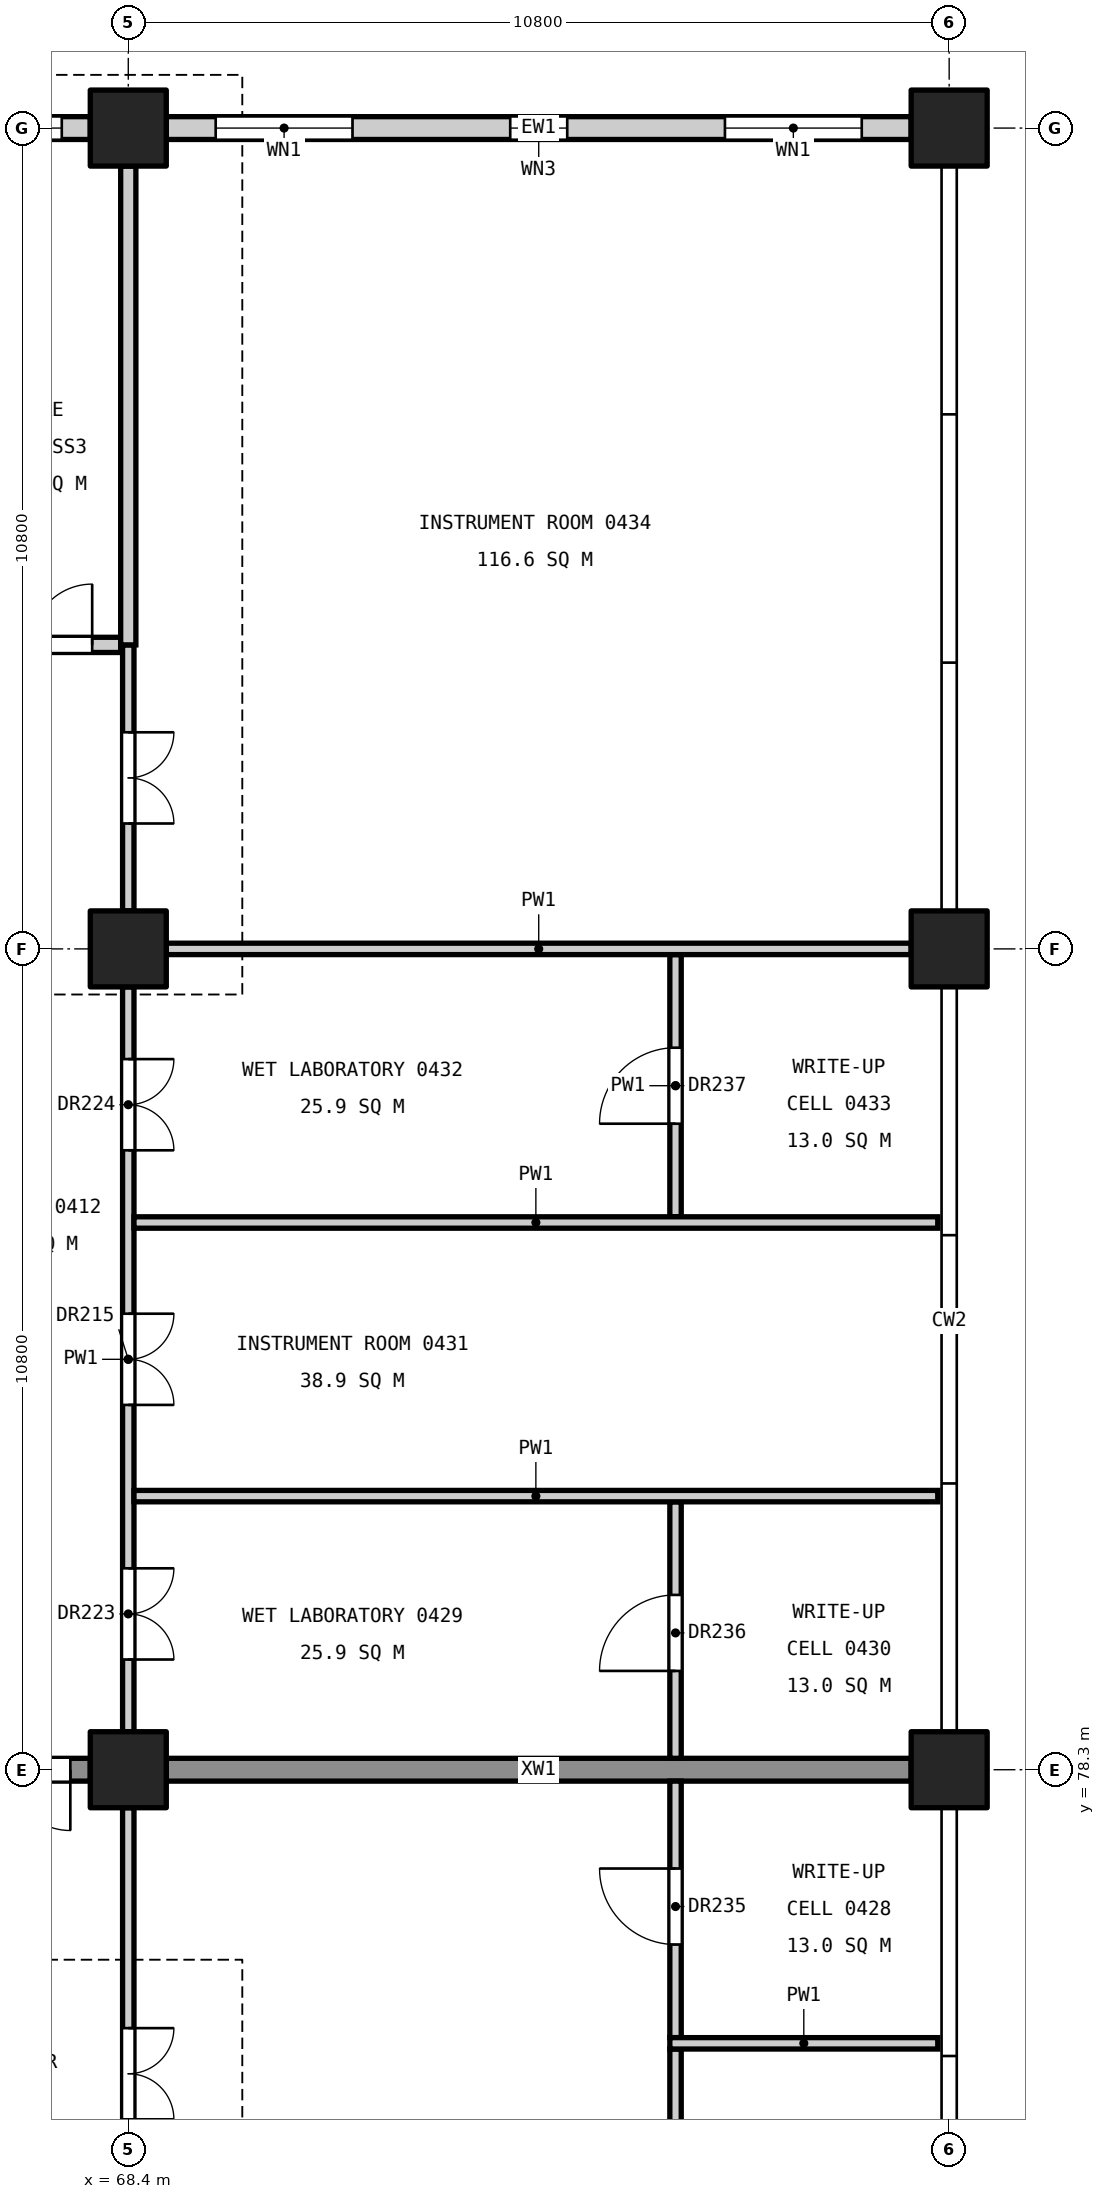
"""IFC4 building model, lengths in metres.
Left out: names, types, materials, properties, quantities, classifications, styles, units other than length and angle.
Written with IfcOpenShell. Run it as: python <this file> out.ifc"""

import sys

from ifc_helpers import new_model, si_unit, direction, frame, frame_2d, origin, origin_2d, place, context, subcontext, project, spatial, rectangle, extrude, element, fill, save


model = new_model("IFC4")
c1 = context("Model", 3, precision=1e-05, world=origin(), true_north=direction((0.0, 1.0)))
c2 = subcontext(c1, "Body", "Model", "MODEL_VIEW")
j1 = project(units=[si_unit("LENGTHUNIT", "METRE"), si_unit("PLANEANGLEUNIT", "RADIAN")], contexts=[c1])
p1 = place(None, origin())
s1 = spatial("IfcSite", under=j1, at=p1, CompositionType="ELEMENT")
p2 = place(p1, origin())
s2 = spatial("IfcBuilding", under=s1, at=p2, CompositionType="ELEMENT")
p3 = place(p2, frame((0.0, 0.0, 22.2)))
s3 = spatial("IfcBuildingStorey", under=s2, at=p3, CompositionType="ELEMENT", Elevation=22.2)
for number, where, z_axis, x_axis in (
    (1, (68.4, 78.3, 0.0), (0.0, 0.0, 1.0), (1.0, 0.0, 0.0)),
    (2, (68.4, 89.1, 0.0), (0.0, 0.0, 1.0), (1.0, 0.0, 0.0)),
    (3, (68.4, 99.9, 0.0), (0.0, 0.0, 1.0), (1.0, 0.0, 0.0)),
    (4, (79.2, 78.3, 0.0), (0.0, 0.0, 1.0), (1.0, 0.0, 0.0)),
    (5, (79.2, 89.1, 0.0), (0.0, 0.0, 1.0), (1.0, 0.0, 0.0)),
    (6, (79.2, 99.9, 0.0), (0.0, 0.0, 1.0), (1.0, 0.0, 0.0)),
):
    element("IfcColumn", number, at=place(p3, frame(where, z_axis=z_axis, x_axis=x_axis)), inside=s3, PredefinedType="COLUMN", context=c2, shape_type="SweptSolid", body=[
        extrude(rectangle(XDim=1.0, YDim=1.0, at=origin_2d()), origin(), (0.0, 0.0, 1.0), 4.8),
    ])
p4 = place(p3, frame((61.7, 78.3, 0.0), z_axis=(0.0, 0.0, 1.0), x_axis=(1.0, 0.0, 0.0)))
e7 = element("IfcWall", 7, at=p4, inside=s3, PredefinedType="SHEAR", context=c2, shape_type="SweptSolid", body=[
    extrude(rectangle(XDim=6.2, YDim=0.3, at=frame_2d((3.1, 0.0))), origin(), (0.0, 0.0, 1.0), 4.55),
])
p5 = place(p4, frame((4.337, 0.0, 0.0)))
e8 = element("IfcOpeningElement", 8, at=p5, cuts=e7, PredefinedType="OPENING", context=c2, shape_type="SweptSolid", body=[
    extrude(rectangle(XDim=1.6, YDim=2.1, at=frame_2d((0.8, 1.05))), frame((0.0, 0.16, 0.0), z_axis=(0.0, -1.0, 0.0), x_axis=(1.0, 0.0, 0.0)), (0.0, 0.0, 1.0), 0.32),
])
p6 = place(p3, frame((68.9, 78.3, 0.0), z_axis=(0.0, 0.0, 1.0), x_axis=(1.0, 0.0, 0.0)))
e9 = element("IfcWall", 9, at=p6, inside=s3, PredefinedType="SHEAR", context=c2, shape_type="SweptSolid", body=[
    extrude(rectangle(XDim=9.8, YDim=0.3, at=frame_2d((4.9, 0.0))), origin(), (0.0, 0.0, 1.0), 4.55),
])
p7 = place(p3, frame((65.95, 99.9, 0.0), z_axis=(0.0, 0.0, 1.0), x_axis=(1.0, 0.0, 0.0)))
e10 = element("IfcWall", 10, at=p7, inside=s3, PredefinedType="STANDARD", context=c2, shape_type="SweptSolid", body=[
    extrude(rectangle(XDim=1.95, YDim=0.3, at=frame_2d((0.975, 0.0))), origin(), (0.0, 0.0, 1.0), 3.85),
])
p8 = place(p7, frame((0.375, 0.0, 0.9)))
e11 = element("IfcOpeningElement", 11, at=p8, cuts=e10, PredefinedType="OPENING", context=c2, shape_type="SweptSolid", body=[
    extrude(rectangle(XDim=1.2, YDim=2.4, at=frame_2d((0.6, 1.2))), frame((0.0, 0.16, 0.0), z_axis=(0.0, -1.0, 0.0), x_axis=(1.0, 0.0, 0.0)), (0.0, 0.0, 1.0), 0.32),
])
p9 = place(p3, frame((68.9, 99.9, 0.0), z_axis=(0.0, 0.0, 1.0), x_axis=(1.0, 0.0, 0.0)))
e12 = element("IfcWall", 12, at=p9, inside=s3, PredefinedType="STANDARD", context=c2, shape_type="SweptSolid", body=[
    extrude(rectangle(XDim=9.8, YDim=0.3, at=frame_2d((4.9, 0.0))), origin(), (0.0, 0.0, 1.0), 3.85),
])
p10 = place(p9, frame((0.65, 0.0, 0.9)))
e13 = element("IfcOpeningElement", 13, at=p10, cuts=e12, PredefinedType="OPENING", context=c2, shape_type="SweptSolid", body=[
    extrude(rectangle(XDim=1.8, YDim=2.4, at=frame_2d((0.9, 1.2))), frame((0.0, 0.16, 0.0), z_axis=(0.0, -1.0, 0.0), x_axis=(1.0, 0.0, 0.0)), (0.0, 0.0, 1.0), 0.32),
])
p11 = place(p9, frame((4.525, 0.0, 0.8)))
e14 = element("IfcOpeningElement", 14, at=p11, cuts=e12, PredefinedType="OPENING", context=c2, shape_type="SweptSolid", body=[
    extrude(rectangle(XDim=0.75, YDim=1.2, at=frame_2d((0.375, 0.6))), frame((0.0, 0.16, 0.0), z_axis=(0.0, -1.0, 0.0), x_axis=(1.0, 0.0, 0.0)), (0.0, 0.0, 1.0), 0.32),
])
p12 = place(p9, frame((7.35, 0.0, 0.9)))
e15 = element("IfcOpeningElement", 15, at=p12, cuts=e12, PredefinedType="OPENING", context=c2, shape_type="SweptSolid", body=[
    extrude(rectangle(XDim=1.8, YDim=2.4, at=frame_2d((0.9, 1.2))), frame((0.0, 0.16, 0.0), z_axis=(0.0, -1.0, 0.0), x_axis=(1.0, 0.0, 0.0)), (0.0, 0.0, 1.0), 0.32),
])
p13 = place(p3, frame((65.95, 93.1, 0.0), z_axis=(0.0, 0.0, 1.0), x_axis=(1.0, 0.0, 0.0)))
e16 = element("IfcWall", 16, at=p13, inside=s3, PredefinedType="PARTITIONING", context=c2, shape_type="SweptSolid", body=[
    extrude(rectangle(XDim=2.35, YDim=0.2, at=frame_2d((1.175, 0.0))), origin(), (0.0, 0.0, 1.0), 3.55),
])
p14 = place(p13, frame((0.375, 0.0, 0.0)))
e17 = element("IfcOpeningElement", 17, at=p14, cuts=e16, PredefinedType="OPENING", context=c2, shape_type="SweptSolid", body=[
    extrude(rectangle(XDim=1.6, YDim=2.1, at=frame_2d((0.8, 1.05))), frame((0.0, 0.11, 0.0), z_axis=(0.0, -1.0, 0.0), x_axis=(1.0, 0.0, 0.0)), (0.0, 0.0, 1.0), 0.22),
])
p15 = place(p3, frame((68.4, 70.8, 0.0), z_axis=(0.0, 0.0, 1.0), x_axis=(0.0, 1.0, 0.0)))
e18 = element("IfcWall", 18, at=p15, inside=s3, PredefinedType="PARTITIONING", context=c2, shape_type="SweptSolid", body=[
    extrude(rectangle(XDim=7.0, YDim=0.15, at=frame_2d((3.5, 0.0))), origin(), (0.0, 0.0, 1.0), 3.55),
])
p16 = place(p15, frame((2.9, 0.0, 0.0)))
e19 = element("IfcOpeningElement", 19, at=p16, cuts=e18, PredefinedType="OPENING", context=c2, shape_type="SweptSolid", body=[
    extrude(rectangle(XDim=1.2, YDim=2.1, at=frame_2d((0.6, 1.05))), frame((0.0, 0.085, 0.0), z_axis=(0.0, -1.0, 0.0), x_axis=(1.0, 0.0, 0.0)), (0.0, 0.0, 1.0), 0.17),
])
p17 = place(p3, frame((68.4, 78.8, 0.0), z_axis=(0.0, 0.0, 1.0), x_axis=(0.0, 1.0, 0.0)))
e20 = element("IfcWall", 20, at=p17, inside=s3, PredefinedType="PARTITIONING", context=c2, shape_type="SweptSolid", body=[
    extrude(rectangle(XDim=9.8, YDim=0.15, at=frame_2d((4.9, 0.0))), origin(), (0.0, 0.0, 1.0), 3.55),
])
p18 = place(p17, frame((4.3, 0.0, 0.0)))
e21 = element("IfcOpeningElement", 21, at=p18, cuts=e20, PredefinedType="OPENING", context=c2, shape_type="SweptSolid", body=[
    extrude(rectangle(XDim=1.2, YDim=2.1, at=frame_2d((0.6, 1.05))), frame((0.0, 0.085, 0.0), z_axis=(0.0, -1.0, 0.0), x_axis=(1.0, 0.0, 0.0)), (0.0, 0.0, 1.0), 0.17),
])
p19 = place(p17, frame((0.95, 0.0, 0.0)))
e22 = element("IfcOpeningElement", 22, at=p19, cuts=e20, PredefinedType="OPENING", context=c2, shape_type="SweptSolid", body=[
    extrude(rectangle(XDim=1.2, YDim=2.1, at=frame_2d((0.6, 1.05))), frame((0.0, 0.085, 0.0), z_axis=(0.0, -1.0, 0.0), x_axis=(1.0, 0.0, 0.0)), (0.0, 0.0, 1.0), 0.17),
])
p20 = place(p17, frame((7.65, 0.0, 0.0)))
e23 = element("IfcOpeningElement", 23, at=p20, cuts=e20, PredefinedType="OPENING", context=c2, shape_type="SweptSolid", body=[
    extrude(rectangle(XDim=1.2, YDim=2.1, at=frame_2d((0.6, 1.05))), frame((0.0, 0.085, 0.0), z_axis=(0.0, -1.0, 0.0), x_axis=(1.0, 0.0, 0.0)), (0.0, 0.0, 1.0), 0.17),
])
p21 = place(p3, frame((68.4, 89.6, 0.0), z_axis=(0.0, 0.0, 1.0), x_axis=(0.0, 1.0, 0.0)))
e24 = element("IfcWall", 24, at=p21, inside=s3, PredefinedType="PARTITIONING", context=c2, shape_type="SweptSolid", body=[
    extrude(rectangle(XDim=3.5, YDim=0.15, at=frame_2d((1.75, 0.0))), origin(), (0.0, 0.0, 1.0), 3.55),
])
p22 = place(p21, frame((1.15, 0.0, 0.0)))
e25 = element("IfcOpeningElement", 25, at=p22, cuts=e24, PredefinedType="OPENING", context=c2, shape_type="SweptSolid", body=[
    extrude(rectangle(XDim=1.2, YDim=2.1, at=frame_2d((0.6, 1.05))), frame((0.0, 0.085, 0.0), z_axis=(0.0, -1.0, 0.0), x_axis=(1.0, 0.0, 0.0)), (0.0, 0.0, 1.0), 0.17),
])
p23 = place(p3, frame((68.4, 93.1, 0.0), z_axis=(0.0, 0.0, 1.0), x_axis=(0.0, 1.0, 0.0)))
e26 = element("IfcWall", 26, at=p23, inside=s3, PredefinedType="PARTITIONING", context=c2, shape_type="SweptSolid", body=[
    extrude(rectangle(XDim=6.3, YDim=0.2, at=frame_2d((3.15, 0.0))), origin(), (0.0, 0.0, 1.0), 3.55),
])
p24 = place(p3, frame((75.6, 71.175, 0.0), z_axis=(0.0, 0.0, 1.0), x_axis=(0.0, 1.0, 0.0)))
e27 = element("IfcWall", 27, at=p24, inside=s3, PredefinedType="PARTITIONING", context=c2, shape_type="SweptSolid", body=[
    extrude(rectangle(XDim=3.45, YDim=0.15, at=frame_2d((1.725, 0.0))), origin(), (0.0, 0.0, 1.0), 3.55),
])
p25 = place(p24, frame((1.225, 0.0, 0.0)))
e28 = element("IfcOpeningElement", 28, at=p25, cuts=e27, PredefinedType="OPENING", context=c2, shape_type="SweptSolid", body=[
    extrude(rectangle(XDim=1.0, YDim=2.1, at=frame_2d((0.5, 1.05))), frame((0.0, 0.085, 0.0), z_axis=(0.0, -1.0, 0.0), x_axis=(1.0, 0.0, 0.0)), (0.0, 0.0, 1.0), 0.17),
])
p26 = place(p3, frame((75.6, 74.775, 0.0), z_axis=(0.0, 0.0, 1.0), x_axis=(0.0, 1.0, 0.0)))
e29 = element("IfcWall", 29, at=p26, inside=s3, PredefinedType="PARTITIONING", context=c2, shape_type="SweptSolid", body=[
    extrude(rectangle(XDim=3.375, YDim=0.15, at=frame_2d((1.688, 0.0))), origin(), (0.0, 0.0, 1.0), 3.55),
])
p27 = place(p26, frame((1.225, 0.0, 0.0)))
e30 = element("IfcOpeningElement", 30, at=p27, cuts=e29, PredefinedType="OPENING", context=c2, shape_type="SweptSolid", body=[
    extrude(rectangle(XDim=1.0, YDim=2.1, at=frame_2d((0.5, 1.05))), frame((0.0, 0.085, 0.0), z_axis=(0.0, -1.0, 0.0), x_axis=(1.0, 0.0, 0.0)), (0.0, 0.0, 1.0), 0.17),
])
p28 = place(p3, frame((75.525, 74.7, 0.0), z_axis=(0.0, 0.0, 1.0), x_axis=(1.0, 0.0, 0.0)))
e31 = element("IfcWall", 31, at=p28, inside=s3, PredefinedType="PARTITIONING", context=c2, shape_type="SweptSolid", body=[
    extrude(rectangle(XDim=3.525, YDim=0.15, at=frame_2d((1.763, 0.0))), origin(), (0.0, 0.0, 1.0), 3.85),
])
p29 = place(p3, frame((75.6, 78.45, 0.0), z_axis=(0.0, 0.0, 1.0), x_axis=(0.0, 1.0, 0.0)))
e32 = element("IfcWall", 32, at=p29, inside=s3, PredefinedType="PARTITIONING", context=c2, shape_type="SweptSolid", body=[
    extrude(rectangle(XDim=3.375, YDim=0.15, at=frame_2d((1.688, 0.0))), origin(), (0.0, 0.0, 1.0), 3.55),
])
p30 = place(p29, frame((1.15, 0.0, 0.0)))
e33 = element("IfcOpeningElement", 33, at=p30, cuts=e32, PredefinedType="OPENING", context=c2, shape_type="SweptSolid", body=[
    extrude(rectangle(XDim=1.0, YDim=2.1, at=frame_2d((0.5, 1.05))), frame((0.0, 0.085, 0.0), z_axis=(0.0, -1.0, 0.0), x_axis=(1.0, 0.0, 0.0)), (0.0, 0.0, 1.0), 0.17),
])
p31 = place(p3, frame((75.6, 85.575, 0.0), z_axis=(0.0, 0.0, 1.0), x_axis=(0.0, 1.0, 0.0)))
e34 = element("IfcWall", 34, at=p31, inside=s3, PredefinedType="PARTITIONING", context=c2, shape_type="SweptSolid", body=[
    extrude(rectangle(XDim=3.45, YDim=0.15, at=frame_2d((1.725, 0.0))), origin(), (0.0, 0.0, 1.0), 3.55),
])
p32 = place(p31, frame((1.225, 0.0, 0.0)))
e35 = element("IfcOpeningElement", 35, at=p32, cuts=e34, PredefinedType="OPENING", context=c2, shape_type="SweptSolid", body=[
    extrude(rectangle(XDim=1.0, YDim=2.1, at=frame_2d((0.5, 1.05))), frame((0.0, 0.085, 0.0), z_axis=(0.0, -1.0, 0.0), x_axis=(1.0, 0.0, 0.0)), (0.0, 0.0, 1.0), 0.17),
])
for number, where, z_axis, x_axis in (
    (36, (68.475, 81.9, 0.0), (0.0, 0.0, 1.0), (1.0, 0.0, 0.0)),
    (37, (68.475, 85.5, 0.0), (0.0, 0.0, 1.0), (1.0, 0.0, 0.0)),
):
    element("IfcWall", number, at=place(p3, frame(where, z_axis=z_axis, x_axis=x_axis)), inside=s3, PredefinedType="PARTITIONING", context=c2, shape_type="SweptSolid", body=[
        extrude(rectangle(XDim=10.575, YDim=0.15, at=frame_2d((5.288, 0.0))), origin(), (0.0, 0.0, 1.0), 3.85),
    ])
p33 = place(p3, frame((68.9, 89.1, 0.0), z_axis=(0.0, 0.0, 1.0), x_axis=(1.0, 0.0, 0.0)))
e38 = element("IfcWall", 38, at=p33, inside=s3, PredefinedType="PARTITIONING", context=c2, shape_type="SweptSolid", body=[
    extrude(rectangle(XDim=9.8, YDim=0.15, at=frame_2d((4.9, 0.0))), origin(), (0.0, 0.0, 1.0), 3.85),
])
p34 = place(p8, origin())
e39 = element("IfcWindow", 39, at=p34, inside=s3, PartitioningType="SINGLE_PANEL", PredefinedType="WINDOW", context=c2, shape_type="SweptSolid", body=[
    extrude(rectangle(XDim=1.2, YDim=2.4, at=frame_2d((0.6, 1.2))), frame((0.0, 0.03, 0.0), z_axis=(0.0, -1.0, 0.0), x_axis=(1.0, 0.0, 0.0)), (0.0, 0.0, 1.0), 0.06),
])
fill(e11, e39)
p35 = place(p10, origin())
e40 = element("IfcWindow", 40, at=p35, inside=s3, PartitioningType="SINGLE_PANEL", PredefinedType="WINDOW", context=c2, shape_type="SweptSolid", body=[
    extrude(rectangle(XDim=1.8, YDim=2.4, at=frame_2d((0.9, 1.2))), frame((0.0, 0.03, 0.0), z_axis=(0.0, -1.0, 0.0), x_axis=(1.0, 0.0, 0.0)), (0.0, 0.0, 1.0), 0.06),
])
fill(e13, e40)
p36 = place(p11, origin())
e41 = element("IfcWindow", 41, at=p36, inside=s3, PartitioningType="SINGLE_PANEL", PredefinedType="WINDOW", context=c2, shape_type="SweptSolid", body=[
    extrude(rectangle(XDim=0.75, YDim=1.2, at=frame_2d((0.375, 0.6))), frame((0.0, 0.03, 0.0), z_axis=(0.0, -1.0, 0.0), x_axis=(1.0, 0.0, 0.0)), (0.0, 0.0, 1.0), 0.06),
])
fill(e14, e41)
p37 = place(p12, origin())
e42 = element("IfcWindow", 42, at=p37, inside=s3, PartitioningType="SINGLE_PANEL", PredefinedType="WINDOW", context=c2, shape_type="SweptSolid", body=[
    extrude(rectangle(XDim=1.8, YDim=2.4, at=frame_2d((0.9, 1.2))), frame((0.0, 0.03, 0.0), z_axis=(0.0, -1.0, 0.0), x_axis=(1.0, 0.0, 0.0)), (0.0, 0.0, 1.0), 0.06),
])
fill(e15, e42)
p38 = place(p18, frame((1.2, 0.0, 0.0), z_axis=(0.0, 0.0, 1.0), x_axis=(-1.0, 0.0, 0.0)))
e43 = element("IfcDoor", 43, at=p38, inside=s3, OperationType="DOUBLE_DOOR_SINGLE_SWING", PredefinedType="DOOR", context=c2, shape_type="SweptSolid", body=[
    extrude(rectangle(XDim=1.2, YDim=2.1, at=frame_2d((0.6, 1.05))), frame((0.0, 0.025, 0.0), z_axis=(0.0, -1.0, 0.0), x_axis=(1.0, 0.0, 0.0)), (0.0, 0.0, 1.0), 0.05),
])
fill(e21, e43)
p39 = place(p22, frame((1.2, 0.0, 0.0), z_axis=(0.0, 0.0, 1.0), x_axis=(-1.0, 0.0, 0.0)))
e44 = element("IfcDoor", 44, at=p39, inside=s3, OperationType="DOUBLE_DOOR_SINGLE_SWING", PredefinedType="DOOR", context=c2, shape_type="SweptSolid", body=[
    extrude(rectangle(XDim=1.2, YDim=2.1, at=frame_2d((0.6, 1.05))), frame((0.0, 0.025, 0.0), z_axis=(0.0, -1.0, 0.0), x_axis=(1.0, 0.0, 0.0)), (0.0, 0.0, 1.0), 0.05),
])
fill(e25, e44)
p40 = place(p16, frame((1.2, 0.0, 0.0), z_axis=(0.0, 0.0, 1.0), x_axis=(-1.0, 0.0, 0.0)))
e45 = element("IfcDoor", 45, at=p40, inside=s3, OperationType="DOUBLE_DOOR_SINGLE_SWING", PredefinedType="DOOR", context=c2, shape_type="SweptSolid", body=[
    extrude(rectangle(XDim=1.2, YDim=2.1, at=frame_2d((0.6, 1.05))), frame((0.0, 0.025, 0.0), z_axis=(0.0, -1.0, 0.0), x_axis=(1.0, 0.0, 0.0)), (0.0, 0.0, 1.0), 0.05),
])
fill(e19, e45)
p41 = place(p19, frame((1.2, 0.0, 0.0), z_axis=(0.0, 0.0, 1.0), x_axis=(-1.0, 0.0, 0.0)))
e46 = element("IfcDoor", 46, at=p41, inside=s3, OperationType="DOUBLE_DOOR_SINGLE_SWING", PredefinedType="DOOR", context=c2, shape_type="SweptSolid", body=[
    extrude(rectangle(XDim=1.2, YDim=2.1, at=frame_2d((0.6, 1.05))), frame((0.0, 0.025, 0.0), z_axis=(0.0, -1.0, 0.0), x_axis=(1.0, 0.0, 0.0)), (0.0, 0.0, 1.0), 0.05),
])
fill(e22, e46)
p42 = place(p20, frame((1.2, 0.0, 0.0), z_axis=(0.0, 0.0, 1.0), x_axis=(-1.0, 0.0, 0.0)))
e47 = element("IfcDoor", 47, at=p42, inside=s3, OperationType="DOUBLE_DOOR_SINGLE_SWING", PredefinedType="DOOR", context=c2, shape_type="SweptSolid", body=[
    extrude(rectangle(XDim=1.2, YDim=2.1, at=frame_2d((0.6, 1.05))), frame((0.0, 0.025, 0.0), z_axis=(0.0, -1.0, 0.0), x_axis=(1.0, 0.0, 0.0)), (0.0, 0.0, 1.0), 0.05),
])
fill(e23, e47)
p43 = place(p27, origin())
e48 = element("IfcDoor", 48, at=p43, inside=s3, OperationType="SINGLE_SWING_RIGHT", PredefinedType="DOOR", context=c2, shape_type="SweptSolid", body=[
    extrude(rectangle(XDim=1.0, YDim=2.1, at=frame_2d((0.5, 1.05))), frame((0.0, 0.025, 0.0), z_axis=(0.0, -1.0, 0.0), x_axis=(1.0, 0.0, 0.0)), (0.0, 0.0, 1.0), 0.05),
])
fill(e30, e48)
p44 = place(p30, origin())
e49 = element("IfcDoor", 49, at=p44, inside=s3, OperationType="SINGLE_SWING_LEFT", PredefinedType="DOOR", context=c2, shape_type="SweptSolid", body=[
    extrude(rectangle(XDim=1.0, YDim=2.1, at=frame_2d((0.5, 1.05))), frame((0.0, 0.025, 0.0), z_axis=(0.0, -1.0, 0.0), x_axis=(1.0, 0.0, 0.0)), (0.0, 0.0, 1.0), 0.05),
])
fill(e33, e49)
p45 = place(p32, origin())
e50 = element("IfcDoor", 50, at=p45, inside=s3, OperationType="SINGLE_SWING_LEFT", PredefinedType="DOOR", context=c2, shape_type="SweptSolid", body=[
    extrude(rectangle(XDim=1.0, YDim=2.1, at=frame_2d((0.5, 1.05))), frame((0.0, 0.025, 0.0), z_axis=(0.0, -1.0, 0.0), x_axis=(1.0, 0.0, 0.0)), (0.0, 0.0, 1.0), 0.05),
])
fill(e35, e50)
p46 = place(p14, origin())
e51 = element("IfcDoor", 51, at=p46, inside=s3, OperationType="DOUBLE_DOOR_SINGLE_SWING", PredefinedType="DOOR", context=c2, shape_type="SweptSolid", body=[
    extrude(rectangle(XDim=1.6, YDim=2.1, at=frame_2d((0.8, 1.05))), frame((0.0, 0.025, 0.0), z_axis=(0.0, -1.0, 0.0), x_axis=(1.0, 0.0, 0.0)), (0.0, 0.0, 1.0), 0.05),
])
fill(e17, e51)
p47 = place(p5, frame((1.6, 0.0, 0.0), z_axis=(0.0, 0.0, 1.0), x_axis=(-1.0, 0.0, 0.0)))
e52 = element("IfcDoor", 52, at=p47, inside=s3, OperationType="DOUBLE_DOOR_SINGLE_SWING", PredefinedType="DOOR", context=c2, shape_type="SweptSolid", body=[
    extrude(rectangle(XDim=1.6, YDim=2.1, at=frame_2d((0.8, 1.05))), frame((0.0, 0.025, 0.0), z_axis=(0.0, -1.0, 0.0), x_axis=(1.0, 0.0, 0.0)), (0.0, 0.0, 1.0), 0.05),
])
fill(e8, e52)
save(model, sys.argv[1])
